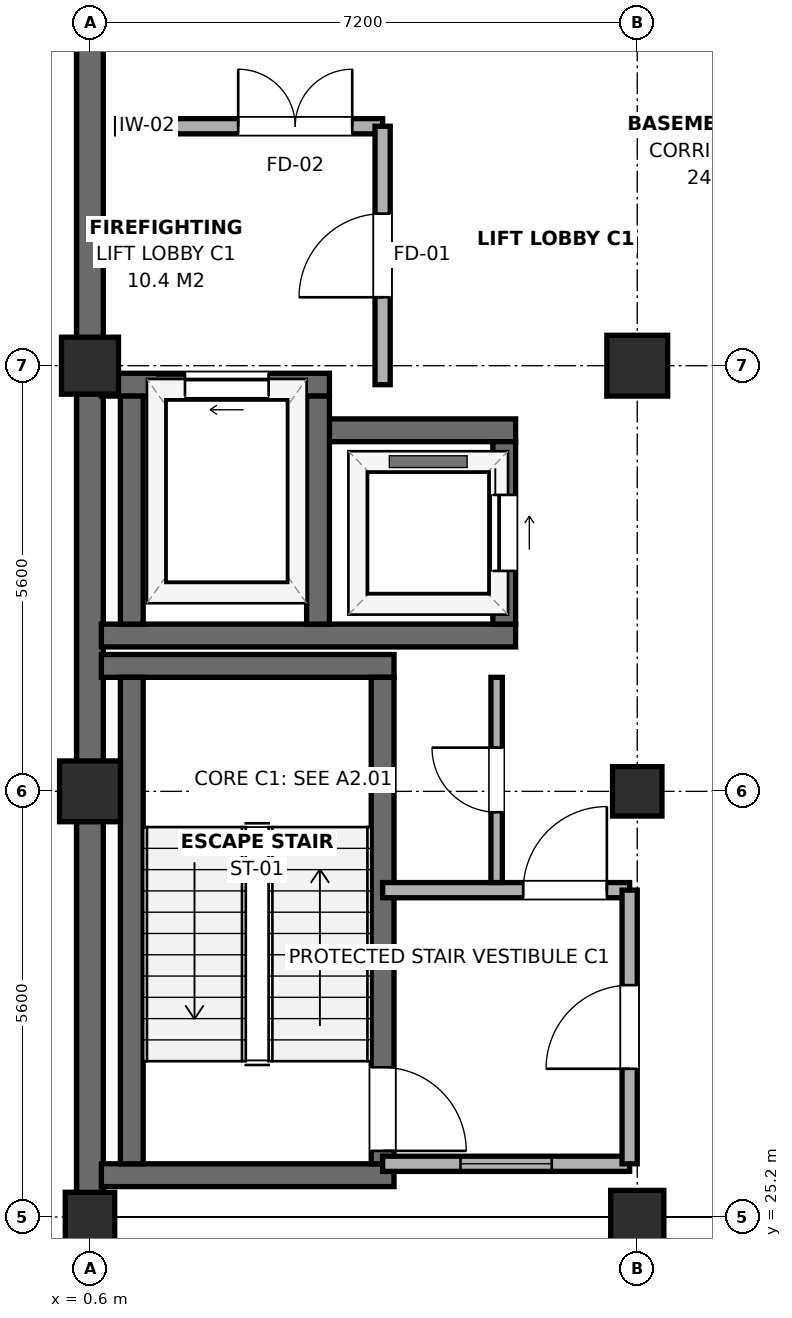
"""IFC4 building model, lengths in metres.
Left out: names, types, materials, properties, quantities, classifications, styles, units other than length and angle.
Written with IfcOpenShell. Run it as: python <this file> out.ifc"""

import sys

from ifc_helpers import new_model, si_unit, direction, frame, frame_2d, origin, origin_2d, place, context, subcontext, project, spatial, rectangle, extrude, element, fill, save


model = new_model("IFC4")
c1 = context("Model", 3, precision=1e-05, world=origin(), true_north=direction((0.0, 1.0)))
c2 = subcontext(c1, "Body", "Model", "MODEL_VIEW")
j1 = project(units=[si_unit("LENGTHUNIT", "METRE"), si_unit("PLANEANGLEUNIT", "RADIAN")], contexts=[c1])
p1 = place(None, origin())
s1 = spatial("IfcSite", under=j1, at=p1, CompositionType="ELEMENT")
p2 = place(p1, origin())
s2 = spatial("IfcBuilding", under=s1, at=p2, CompositionType="ELEMENT")
p3 = place(p2, frame((0.0, 0.0, -4.2)))
s3 = spatial("IfcBuildingStorey", under=s2, at=p3, CompositionType="ELEMENT", Elevation=-4.2)
p4 = place(p3, frame((0.6, 25.2, 0.0), z_axis=(0.0, 0.0, 1.0), x_axis=(1.0, 0.0, 0.0)))
e1 = element("IfcColumn", 1, at=p4, inside=s3, PredefinedType="COLUMN", context=c2, shape_type="SweptSolid", body=[
    extrude(rectangle(XDim=0.65, YDim=0.65, at=origin_2d()), origin(), (0.0, 0.0, 1.0), 4.2),
])
p5 = place(p3, frame((0.6, 30.8, 0.0), z_axis=(0.0, 0.0, 1.0), x_axis=(1.0, 0.0, 0.0)))
e2 = element("IfcColumn", 2, at=p5, inside=s3, PredefinedType="COLUMN", context=c2, shape_type="SweptSolid", body=[
    extrude(rectangle(XDim=0.8, YDim=0.8, at=origin_2d()), origin(), (0.0, 0.0, 1.0), 4.2),
])
p6 = place(p3, frame((0.6, 36.4, 0.0), z_axis=(0.0, 0.0, 1.0), x_axis=(1.0, 0.0, 0.0)))
e3 = element("IfcColumn", 3, at=p6, inside=s3, PredefinedType="COLUMN", context=c2, shape_type="SweptSolid", body=[
    extrude(rectangle(XDim=0.75, YDim=0.75, at=origin_2d()), origin(), (0.0, 0.0, 1.0), 4.2),
])
p7 = place(p3, frame((7.8, 25.2, 0.0), z_axis=(0.0, 0.0, 1.0), x_axis=(1.0, 0.0, 0.0)))
e4 = element("IfcColumn", 4, at=p7, inside=s3, PredefinedType="COLUMN", context=c2, shape_type="SweptSolid", body=[
    extrude(rectangle(XDim=0.7, YDim=0.7, at=origin_2d()), origin(), (0.0, 0.0, 1.0), 4.2),
])
p8 = place(p3, frame((7.8, 30.8, 0.0), z_axis=(0.0, 0.0, 1.0), x_axis=(1.0, 0.0, 0.0)))
e5 = element("IfcColumn", 5, at=p8, inside=s3, PredefinedType="COLUMN", context=c2, shape_type="SweptSolid", body=[
    extrude(rectangle(XDim=0.65, YDim=0.65, at=origin_2d()), origin(), (0.0, 0.0, 1.0), 4.2),
])
p9 = place(p3, frame((7.8, 36.4, 0.0), z_axis=(0.0, 0.0, 1.0), x_axis=(1.0, 0.0, 0.0)))
e6 = element("IfcColumn", 6, at=p9, inside=s3, PredefinedType="COLUMN", context=c2, shape_type="SweptSolid", body=[
    extrude(rectangle(XDim=0.8, YDim=0.8, at=origin_2d()), origin(), (0.0, 0.0, 1.0), 4.2),
])
p10 = place(p3, frame((0.6, 130.625, 0.0), z_axis=(0.0, 0.0, 1.0), x_axis=(0.0, -1.0, 0.0)))
e7 = element("IfcWall", 7, at=p10, inside=s3, PredefinedType="USERDEFINED", context=c2, shape_type="SweptSolid", body=[
    extrude(rectangle(XDim=129.25, YDim=0.35, at=frame_2d((64.625, 0.0))), origin(), (0.0, 0.0, 1.0), 3.92),
])
for number, where, z_axis, x_axis in (
    (8, (0.75, 25.75, 0.0), (0.0, 0.0, 1.0), (1.0, 0.0, 0.0)),
    (9, (0.75, 32.45, 0.0), (0.0, 0.0, 1.0), (1.0, 0.0, 0.0)),
):
    element("IfcWall", number, at=place(p3, frame(where, z_axis=z_axis, x_axis=x_axis)), inside=s3, PredefinedType="SHEAR", context=c2, shape_type="SweptSolid", body=[
        extrude(rectangle(XDim=3.85, YDim=0.3, at=frame_2d((1.925, 0.0))), origin(), (0.0, 0.0, 1.0), 3.92),
    ])
p11 = place(p3, frame((1.15, 25.9, 0.0), z_axis=(0.0, 0.0, 1.0), x_axis=(0.0, 1.0, 0.0)))
e10 = element("IfcWall", 10, at=p11, inside=s3, PredefinedType="SHEAR", context=c2, shape_type="SweptSolid", body=[
    extrude(rectangle(XDim=6.4, YDim=0.3, at=frame_2d((3.2, 0.0))), origin(), (0.0, 0.0, 1.0), 3.92),
])
p12 = place(p3, frame((4.45, 25.9, 0.0), z_axis=(0.0, 0.0, 1.0), x_axis=(0.0, 1.0, 0.0)))
e11 = element("IfcWall", 11, at=p12, inside=s3, PredefinedType="SHEAR", context=c2, shape_type="SweptSolid", body=[
    extrude(rectangle(XDim=6.4, YDim=0.3, at=frame_2d((3.2, 0.0))), origin(), (0.0, 0.0, 1.0), 3.92),
])
p13 = place(p12, frame((0.17, 0.0, 0.0)))
e12 = element("IfcOpeningElement", 12, at=p13, cuts=e11, PredefinedType="OPENING", context=c2, shape_type="SweptSolid", body=[
    extrude(rectangle(XDim=1.1, YDim=2.15, at=frame_2d((0.55, 1.075))), frame((0.0, 0.165, 0.0), z_axis=(0.0, -1.0, 0.0), x_axis=(1.0, 0.0, 0.0)), (0.0, 0.0, 1.0), 0.33),
])
p14 = place(p3, frame((0.75, 32.85, 0.0), z_axis=(0.0, 0.0, 1.0), x_axis=(1.0, 0.0, 0.0)))
e13 = element("IfcWall", 13, at=p14, inside=s3, PredefinedType="SHEAR", context=c2, shape_type="SweptSolid", body=[
    extrude(rectangle(XDim=5.45, YDim=0.3, at=frame_2d((2.725, 0.0))), origin(), (0.0, 0.0, 1.0), 3.92),
])
p15 = place(p3, frame((0.75, 36.15, 0.0), z_axis=(0.0, 0.0, 1.0), x_axis=(1.0, 0.0, 0.0)))
e14 = element("IfcWall", 14, at=p15, inside=s3, PredefinedType="SHEAR", context=c2, shape_type="SweptSolid", body=[
    extrude(rectangle(XDim=3.0, YDim=0.3, at=frame_2d((1.5, 0.0))), origin(), (0.0, 0.0, 1.0), 3.92),
])
p16 = place(p15, frame((1.1, 0.0, 0.0)))
e15 = element("IfcOpeningElement", 15, at=p16, cuts=e14, PredefinedType="OPENING", context=c2, shape_type="SweptSolid", body=[
    extrude(rectangle(XDim=1.1, YDim=2.15, at=frame_2d((0.55, 1.075))), frame((0.0, 0.165, 0.0), z_axis=(0.0, -1.0, 0.0), x_axis=(1.0, 0.0, 0.0)), (0.0, 0.0, 1.0), 0.33),
])
p17 = place(p3, frame((3.75, 35.55, 0.0), z_axis=(0.0, 0.0, 1.0), x_axis=(1.0, 0.0, 0.0)))
e16 = element("IfcWall", 16, at=p17, inside=s3, PredefinedType="SHEAR", context=c2, shape_type="SweptSolid", body=[
    extrude(rectangle(XDim=2.45, YDim=0.3, at=frame_2d((1.225, 0.0))), origin(), (0.0, 0.0, 1.0), 3.92),
])
for number, where, z_axis, x_axis in (
    (17, (1.15, 33.0, 0.0), (0.0, 0.0, 1.0), (0.0, 1.0, 0.0)),
    (18, (3.6, 33.0, 0.0), (0.0, 0.0, 1.0), (0.0, 1.0, 0.0)),
):
    element("IfcWall", number, at=place(p3, frame(where, z_axis=z_axis, x_axis=x_axis)), inside=s3, PredefinedType="SHEAR", context=c2, shape_type="SweptSolid", body=[
        extrude(rectangle(XDim=3.0, YDim=0.3, at=frame_2d((1.5, 0.0))), origin(), (0.0, 0.0, 1.0), 3.92),
    ])
p18 = place(p3, frame((6.05, 33.0, 0.0), z_axis=(0.0, 0.0, 1.0), x_axis=(0.0, 1.0, 0.0)))
e19 = element("IfcWall", 19, at=p18, inside=s3, PredefinedType="SHEAR", context=c2, shape_type="SweptSolid", body=[
    extrude(rectangle(XDim=2.4, YDim=0.3, at=frame_2d((1.2, 0.0))), origin(), (0.0, 0.0, 1.0), 3.92),
])
p19 = place(p18, frame((0.7, 0.0, 0.0)))
e20 = element("IfcOpeningElement", 20, at=p19, cuts=e19, PredefinedType="OPENING", context=c2, shape_type="SweptSolid", body=[
    extrude(rectangle(XDim=1.0, YDim=2.15, at=frame_2d((0.5, 1.075))), frame((0.0, 0.165, 0.0), z_axis=(0.0, -1.0, 0.0), x_axis=(1.0, 0.0, 0.0)), (0.0, 0.0, 1.0), 0.33),
])
p20 = place(p3, frame((0.95, 39.55, 0.0), z_axis=(0.0, 0.0, 1.0), x_axis=(1.0, 0.0, 0.0)))
e21 = element("IfcWall", 21, at=p20, inside=s3, PredefinedType="PARTITIONING", context=c2, shape_type="SweptSolid", body=[
    extrude(rectangle(XDim=3.5, YDim=0.2, at=frame_2d((1.75, 0.0))), origin(), (0.0, 0.0, 1.0), 3.915),
])
p21 = place(p20, frame((1.6, 0.0, 0.0)))
e22 = element("IfcOpeningElement", 22, at=p21, cuts=e21, PredefinedType="OPENING", context=c2, shape_type="SweptSolid", body=[
    extrude(rectangle(XDim=1.5, YDim=2.15, at=frame_2d((0.75, 1.075))), frame((0.0, 0.115, 0.0), z_axis=(0.0, -1.0, 0.0), x_axis=(1.0, 0.0, 0.0)), (0.0, 0.0, 1.0), 0.23),
])
p22 = place(p3, frame((4.45, 36.15, 0.0), z_axis=(0.0, 0.0, 1.0), x_axis=(0.0, 1.0, 0.0)))
e23 = element("IfcWall", 23, at=p22, inside=s3, PredefinedType="PARTITIONING", context=c2, shape_type="SweptSolid", body=[
    extrude(rectangle(XDim=3.4, YDim=0.2, at=frame_2d((1.7, 0.0))), origin(), (0.0, 0.0, 1.0), 3.265),
])
p23 = place(p22, frame((1.15, 0.0, 0.0)))
e24 = element("IfcOpeningElement", 24, at=p23, cuts=e23, PredefinedType="OPENING", context=c2, shape_type="SweptSolid", body=[
    extrude(rectangle(XDim=1.1, YDim=2.15, at=frame_2d((0.55, 1.075))), frame((0.0, 0.115, 0.0), z_axis=(0.0, -1.0, 0.0), x_axis=(1.0, 0.0, 0.0)), (0.0, 0.0, 1.0), 0.23),
])
p24 = place(p3, frame((4.45, 25.9, 0.0), z_axis=(0.0, 0.0, 1.0), x_axis=(1.0, 0.0, 0.0)))
e25 = element("IfcWall", 25, at=p24, inside=s3, PredefinedType="PARTITIONING", context=c2, shape_type="SweptSolid", body=[
    extrude(rectangle(XDim=3.25, YDim=0.2, at=frame_2d((1.625, 0.0))), origin(), (0.0, 0.0, 1.0), 3.315),
])
p25 = place(p24, frame((1.025, 0.0, 0.95)))
e26 = element("IfcOpeningElement", 26, at=p25, cuts=e25, PredefinedType="OPENING", context=c2, shape_type="SweptSolid", body=[
    extrude(rectangle(XDim=1.2, YDim=1.5, at=frame_2d((0.6, 0.75))), frame((0.0, 0.115, 0.0), z_axis=(0.0, -1.0, 0.0), x_axis=(1.0, 0.0, 0.0)), (0.0, 0.0, 1.0), 0.23),
])
p26 = place(p3, frame((4.45, 29.5, 0.0), z_axis=(0.0, 0.0, 1.0), x_axis=(1.0, 0.0, 0.0)))
e27 = element("IfcWall", 27, at=p26, inside=s3, PredefinedType="PARTITIONING", context=c2, shape_type="SweptSolid", body=[
    extrude(rectangle(XDim=3.25, YDim=0.2, at=frame_2d((1.625, 0.0))), origin(), (0.0, 0.0, 1.0), 3.315),
])
p27 = place(p26, frame((1.85, 0.0, 0.0)))
e28 = element("IfcOpeningElement", 28, at=p27, cuts=e27, PredefinedType="OPENING", context=c2, shape_type="SweptSolid", body=[
    extrude(rectangle(XDim=1.1, YDim=2.15, at=frame_2d((0.55, 1.075))), frame((0.0, 0.115, 0.0), z_axis=(0.0, -1.0, 0.0), x_axis=(1.0, 0.0, 0.0)), (0.0, 0.0, 1.0), 0.23),
])
p28 = place(p3, frame((7.7, 25.9, 0.0), z_axis=(0.0, 0.0, 1.0), x_axis=(0.0, 1.0, 0.0)))
e29 = element("IfcWall", 29, at=p28, inside=s3, PredefinedType="PARTITIONING", context=c2, shape_type="SweptSolid", body=[
    extrude(rectangle(XDim=3.6, YDim=0.2, at=frame_2d((1.8, 0.0))), origin(), (0.0, 0.0, 1.0), 3.315),
])
p29 = place(p28, frame((1.25, 0.0, 0.0)))
e30 = element("IfcOpeningElement", 30, at=p29, cuts=e29, PredefinedType="OPENING", context=c2, shape_type="SweptSolid", body=[
    extrude(rectangle(XDim=1.1, YDim=2.15, at=frame_2d((0.55, 1.075))), frame((0.0, 0.115, 0.0), z_axis=(0.0, -1.0, 0.0), x_axis=(1.0, 0.0, 0.0)), (0.0, 0.0, 1.0), 0.23),
])
p30 = place(p3, frame((5.95, 29.6, 0.0), z_axis=(0.0, 0.0, 1.0), x_axis=(0.0, 1.0, 0.0)))
e31 = element("IfcWall", 31, at=p30, inside=s3, PredefinedType="PARTITIONING", context=c2, shape_type="SweptSolid", body=[
    extrude(rectangle(XDim=2.7, YDim=0.15, at=frame_2d((1.35, 0.0))), origin(), (0.0, 0.0, 1.0), 3.915),
])
p31 = place(p30, frame((0.925, 0.0, 0.0)))
e32 = element("IfcOpeningElement", 32, at=p31, cuts=e31, PredefinedType="OPENING", context=c2, shape_type="SweptSolid", body=[
    extrude(rectangle(XDim=0.85, YDim=2.1, at=frame_2d((0.425, 1.05))), frame((0.0, 0.09, 0.0), z_axis=(0.0, -1.0, 0.0), x_axis=(1.0, 0.0, 0.0)), (0.0, 0.0, 1.0), 0.18),
])
p32 = place(p13, frame((1.1, 0.0, 0.0), z_axis=(0.0, 0.0, 1.0), x_axis=(-1.0, 0.0, 0.0)))
e33 = element("IfcDoor", 33, at=p32, inside=s3, OperationType="SINGLE_SWING_RIGHT", PredefinedType="DOOR", context=c2, shape_type="SweptSolid", body=[
    extrude(rectangle(XDim=1.1, YDim=2.15, at=frame_2d((0.55, 1.075))), frame((0.0, 0.025, 0.0), z_axis=(0.0, -1.0, 0.0), x_axis=(1.0, 0.0, 0.0)), (0.0, 0.0, 1.0), 0.05),
])
fill(e12, e33)
p33 = place(p16, origin())
e34 = element("IfcDoor", 34, at=p33, inside=s3, OperationType="SLIDING_TO_LEFT", PredefinedType="DOOR", context=c2, shape_type="SweptSolid", body=[
    extrude(rectangle(XDim=1.1, YDim=2.15, at=frame_2d((0.55, 1.075))), frame((0.0, 0.025, 0.0), z_axis=(0.0, -1.0, 0.0), x_axis=(1.0, 0.0, 0.0)), (0.0, 0.0, 1.0), 0.05),
])
fill(e15, e34)
p34 = place(p19, frame((1.0, 0.0, 0.0), z_axis=(0.0, 0.0, 1.0), x_axis=(-1.0, 0.0, 0.0)))
e35 = element("IfcDoor", 35, at=p34, inside=s3, OperationType="SLIDING_TO_RIGHT", PredefinedType="DOOR", context=c2, shape_type="SweptSolid", body=[
    extrude(rectangle(XDim=1.0, YDim=2.15, at=frame_2d((0.5, 1.075))), frame((0.0, 0.025, 0.0), z_axis=(0.0, -1.0, 0.0), x_axis=(1.0, 0.0, 0.0)), (0.0, 0.0, 1.0), 0.05),
])
fill(e20, e35)
p35 = place(p21, origin())
e36 = element("IfcDoor", 36, at=p35, inside=s3, OperationType="DOUBLE_DOOR_SINGLE_SWING", PredefinedType="DOOR", context=c2, shape_type="SweptSolid", body=[
    extrude(rectangle(XDim=1.5, YDim=2.15, at=frame_2d((0.75, 1.075))), frame((0.0, 0.025, 0.0), z_axis=(0.0, -1.0, 0.0), x_axis=(1.0, 0.0, 0.0)), (0.0, 0.0, 1.0), 0.05),
])
fill(e22, e36)
p36 = place(p23, origin())
e37 = element("IfcDoor", 37, at=p36, inside=s3, OperationType="SINGLE_SWING_LEFT", PredefinedType="DOOR", context=c2, shape_type="SweptSolid", body=[
    extrude(rectangle(XDim=1.1, YDim=2.15, at=frame_2d((0.55, 1.075))), frame((0.0, 0.025, 0.0), z_axis=(0.0, -1.0, 0.0), x_axis=(1.0, 0.0, 0.0)), (0.0, 0.0, 1.0), 0.05),
])
fill(e24, e37)
p37 = place(p25, origin())
e38 = element("IfcWindow", 38, at=p37, inside=s3, PartitioningType="SINGLE_PANEL", PredefinedType="WINDOW", context=c2, shape_type="SweptSolid", body=[
    extrude(rectangle(XDim=1.2, YDim=1.5, at=frame_2d((0.6, 0.75))), frame((0.0, 0.03, 0.0), z_axis=(0.0, -1.0, 0.0), x_axis=(1.0, 0.0, 0.0)), (0.0, 0.0, 1.0), 0.06),
])
fill(e26, e38)
p38 = place(p27, origin())
e39 = element("IfcDoor", 39, at=p38, inside=s3, OperationType="SINGLE_SWING_RIGHT", PredefinedType="DOOR", context=c2, shape_type="SweptSolid", body=[
    extrude(rectangle(XDim=1.1, YDim=2.15, at=frame_2d((0.55, 1.075))), frame((0.0, 0.025, 0.0), z_axis=(0.0, -1.0, 0.0), x_axis=(1.0, 0.0, 0.0)), (0.0, 0.0, 1.0), 0.05),
])
fill(e28, e39)
p39 = place(p29, origin())
e40 = element("IfcDoor", 40, at=p39, inside=s3, OperationType="SINGLE_SWING_LEFT", PredefinedType="DOOR", context=c2, shape_type="SweptSolid", body=[
    extrude(rectangle(XDim=1.1, YDim=2.15, at=frame_2d((0.55, 1.075))), frame((0.0, 0.025, 0.0), z_axis=(0.0, -1.0, 0.0), x_axis=(1.0, 0.0, 0.0)), (0.0, 0.0, 1.0), 0.05),
])
fill(e30, e40)
p40 = place(p31, origin())
e41 = element("IfcDoor", 41, at=p40, inside=s3, OperationType="SINGLE_SWING_RIGHT", PredefinedType="DOOR", context=c2, shape_type="SweptSolid", body=[
    extrude(rectangle(XDim=0.85, YDim=2.1, at=frame_2d((0.425, 1.05))), frame((0.0, 0.025, 0.0), z_axis=(0.0, -1.0, 0.0), x_axis=(1.0, 0.0, 0.0)), (0.0, 0.0, 1.0), 0.05),
])
fill(e32, e41)
save(model, sys.argv[1])
